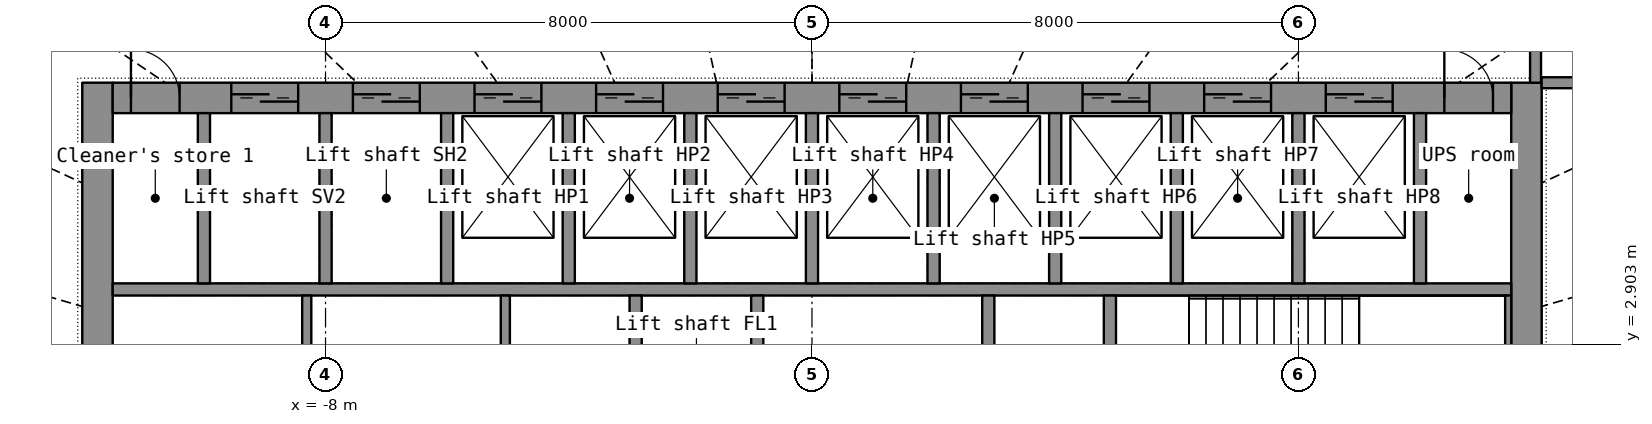
"""IFC4 building model, lengths in metres.
Left out: names, types, materials, properties, quantities, classifications, styles, units other than length and angle.
Written with IfcOpenShell. Run it as: python <this file> out.ifc"""

import sys

from ifc_helpers import new_model, si_unit, direction, frame, frame_2d, origin, place, context, subcontext, project, spatial, rectangle, extrude, element, fill, save


model = new_model("IFC4")
c1 = context("Model", 3, precision=1e-05, world=origin(), true_north=direction((0.0, 1.0)))
c2 = subcontext(c1, "Body", "Model", "MODEL_VIEW")
j1 = project(units=[si_unit("LENGTHUNIT", "METRE"), si_unit("PLANEANGLEUNIT", "RADIAN")], contexts=[c1])
p1 = place(None, origin())
s1 = spatial("IfcSite", under=j1, at=p1, CompositionType="ELEMENT")
p2 = place(p1, origin())
s2 = spatial("IfcBuilding", under=s1, at=p2, CompositionType="ELEMENT")
p3 = place(p2, frame((0.0, 0.0, 145.2)))
s3 = spatial("IfcBuildingStorey", under=s2, at=p3, CompositionType="ELEMENT", Elevation=145.2)
p4 = place(p3, frame((-11.75, -7.2, 0.0), z_axis=(0.0, 0.0, 1.0), x_axis=(0.0, 1.0, 0.0)))
e1 = element("IfcWall", 1, at=p4, inside=s3, PredefinedType="SHEAR", context=c2, shape_type="SweptSolid", body=[
    extrude(rectangle(XDim=14.4, YDim=0.5, at=frame_2d((7.2, 0.0))), origin(), (0.0, 0.0, 1.0), 7.0),
])
p5 = place(p4, frame((6.5, 0.0, 0.0)))
e2 = element("IfcOpeningElement", 2, at=p5, cuts=e1, PredefinedType="OPENING", context=c2, shape_type="SweptSolid", body=[
    extrude(rectangle(XDim=1.4, YDim=2.2, at=frame_2d((0.7, 1.1))), frame((0.0, 0.26, 0.0), z_axis=(0.0, -1.0, 0.0), x_axis=(1.0, 0.0, 0.0)), (0.0, 0.0, 1.0), 0.52),
])
p6 = place(p3, frame((11.75, -7.2, 0.0), z_axis=(0.0, 0.0, 1.0), x_axis=(0.0, 1.0, 0.0)))
e3 = element("IfcWall", 3, at=p6, inside=s3, PredefinedType="SHEAR", context=c2, shape_type="SweptSolid", body=[
    extrude(rectangle(XDim=14.4, YDim=0.5, at=frame_2d((7.2, 0.0))), origin(), (0.0, 0.0, 1.0), 7.0),
])
p7 = place(p6, frame((6.5, 0.0, 0.0)))
e4 = element("IfcOpeningElement", 4, at=p7, cuts=e3, PredefinedType="OPENING", context=c2, shape_type="SweptSolid", body=[
    extrude(rectangle(XDim=1.4, YDim=2.2, at=frame_2d((0.7, 1.1))), frame((0.0, 0.26, 0.0), z_axis=(0.0, -1.0, 0.0), x_axis=(1.0, 0.0, 0.0)), (0.0, 0.0, 1.0), 0.52),
])
p8 = place(p3, frame((-11.5, 6.95, 0.0), z_axis=(0.0, 0.0, 1.0), x_axis=(1.0, 0.0, 0.0)))
e5 = element("IfcWall", 5, at=p8, inside=s3, PredefinedType="SHEAR", context=c2, shape_type="SweptSolid", body=[
    extrude(rectangle(XDim=23.0, YDim=0.5, at=frame_2d((11.5, 0.0))), origin(), (0.0, 0.0, 1.0), 7.0),
])
p9 = place(p8, frame((1.95, 0.0, 0.0)))
e6 = element("IfcOpeningElement", 6, at=p9, cuts=e5, PredefinedType="OPENING", context=c2, shape_type="SweptSolid", body=[
    extrude(rectangle(XDim=1.1, YDim=2.2, at=frame_2d((0.55, 1.1))), frame((0.0, 0.26, 0.0), z_axis=(0.0, -1.0, 0.0), x_axis=(1.0, 0.0, 0.0)), (0.0, 0.0, 1.0), 0.52),
])
p10 = place(p8, frame((3.95, 0.0, 0.0)))
e7 = element("IfcOpeningElement", 7, at=p10, cuts=e5, PredefinedType="OPENING", context=c2, shape_type="SweptSolid", body=[
    extrude(rectangle(XDim=1.1, YDim=2.2, at=frame_2d((0.55, 1.1))), frame((0.0, 0.26, 0.0), z_axis=(0.0, -1.0, 0.0), x_axis=(1.0, 0.0, 0.0)), (0.0, 0.0, 1.0), 0.52),
])
p11 = place(p8, frame((5.95, 0.0, 0.0)))
e8 = element("IfcOpeningElement", 8, at=p11, cuts=e5, PredefinedType="OPENING", context=c2, shape_type="SweptSolid", body=[
    extrude(rectangle(XDim=1.1, YDim=2.2, at=frame_2d((0.55, 1.1))), frame((0.0, 0.26, 0.0), z_axis=(0.0, -1.0, 0.0), x_axis=(1.0, 0.0, 0.0)), (0.0, 0.0, 1.0), 0.52),
])
p12 = place(p8, frame((7.95, 0.0, 0.0)))
e9 = element("IfcOpeningElement", 9, at=p12, cuts=e5, PredefinedType="OPENING", context=c2, shape_type="SweptSolid", body=[
    extrude(rectangle(XDim=1.1, YDim=2.2, at=frame_2d((0.55, 1.1))), frame((0.0, 0.26, 0.0), z_axis=(0.0, -1.0, 0.0), x_axis=(1.0, 0.0, 0.0)), (0.0, 0.0, 1.0), 0.52),
])
p13 = place(p8, frame((9.95, 0.0, 0.0)))
e10 = element("IfcOpeningElement", 10, at=p13, cuts=e5, PredefinedType="OPENING", context=c2, shape_type="SweptSolid", body=[
    extrude(rectangle(XDim=1.1, YDim=2.2, at=frame_2d((0.55, 1.1))), frame((0.0, 0.26, 0.0), z_axis=(0.0, -1.0, 0.0), x_axis=(1.0, 0.0, 0.0)), (0.0, 0.0, 1.0), 0.52),
])
p14 = place(p8, frame((11.95, 0.0, 0.0)))
e11 = element("IfcOpeningElement", 11, at=p14, cuts=e5, PredefinedType="OPENING", context=c2, shape_type="SweptSolid", body=[
    extrude(rectangle(XDim=1.1, YDim=2.2, at=frame_2d((0.55, 1.1))), frame((0.0, 0.26, 0.0), z_axis=(0.0, -1.0, 0.0), x_axis=(1.0, 0.0, 0.0)), (0.0, 0.0, 1.0), 0.52),
])
p15 = place(p8, frame((13.95, 0.0, 0.0)))
e12 = element("IfcOpeningElement", 12, at=p15, cuts=e5, PredefinedType="OPENING", context=c2, shape_type="SweptSolid", body=[
    extrude(rectangle(XDim=1.1, YDim=2.2, at=frame_2d((0.55, 1.1))), frame((0.0, 0.26, 0.0), z_axis=(0.0, -1.0, 0.0), x_axis=(1.0, 0.0, 0.0)), (0.0, 0.0, 1.0), 0.52),
])
p16 = place(p8, frame((15.95, 0.0, 0.0)))
e13 = element("IfcOpeningElement", 13, at=p16, cuts=e5, PredefinedType="OPENING", context=c2, shape_type="SweptSolid", body=[
    extrude(rectangle(XDim=1.1, YDim=2.2, at=frame_2d((0.55, 1.1))), frame((0.0, 0.26, 0.0), z_axis=(0.0, -1.0, 0.0), x_axis=(1.0, 0.0, 0.0)), (0.0, 0.0, 1.0), 0.52),
])
p17 = place(p8, frame((17.95, 0.0, 0.0)))
e14 = element("IfcOpeningElement", 14, at=p17, cuts=e5, PredefinedType="OPENING", context=c2, shape_type="SweptSolid", body=[
    extrude(rectangle(XDim=1.1, YDim=2.2, at=frame_2d((0.55, 1.1))), frame((0.0, 0.26, 0.0), z_axis=(0.0, -1.0, 0.0), x_axis=(1.0, 0.0, 0.0)), (0.0, 0.0, 1.0), 0.52),
])
p18 = place(p8, frame((19.95, 0.0, 0.0)))
e15 = element("IfcOpeningElement", 15, at=p18, cuts=e5, PredefinedType="OPENING", context=c2, shape_type="SweptSolid", body=[
    extrude(rectangle(XDim=1.1, YDim=2.2, at=frame_2d((0.55, 1.1))), frame((0.0, 0.26, 0.0), z_axis=(0.0, -1.0, 0.0), x_axis=(1.0, 0.0, 0.0)), (0.0, 0.0, 1.0), 0.52),
])
p19 = place(p8, frame((0.3, 0.0, 0.0)))
e16 = element("IfcOpeningElement", 16, at=p19, cuts=e5, PredefinedType="OPENING", context=c2, shape_type="SweptSolid", body=[
    extrude(rectangle(XDim=0.8, YDim=2.05, at=frame_2d((0.4, 1.025))), frame((0.0, 0.26, 0.0), z_axis=(0.0, -1.0, 0.0), x_axis=(1.0, 0.0, 0.0)), (0.0, 0.0, 1.0), 0.52),
])
p20 = place(p8, frame((21.9, 0.0, 0.0)))
e17 = element("IfcOpeningElement", 17, at=p20, cuts=e5, PredefinedType="OPENING", context=c2, shape_type="SweptSolid", body=[
    extrude(rectangle(XDim=0.8, YDim=2.05, at=frame_2d((0.4, 1.025))), frame((0.0, 0.26, 0.0), z_axis=(0.0, -1.0, 0.0), x_axis=(1.0, 0.0, 0.0)), (0.0, 0.0, 1.0), 0.52),
])
p21 = place(p3, frame((-11.5, 3.8, 0.0), z_axis=(0.0, 0.0, 1.0), x_axis=(1.0, 0.0, 0.0)))
e18 = element("IfcWall", 18, at=p21, inside=s3, PredefinedType="SHEAR", context=c2, shape_type="SweptSolid", body=[
    extrude(rectangle(XDim=23.0, YDim=0.2, at=frame_2d((11.5, 0.0))), origin(), (0.0, 0.0, 1.0), 7.0),
])
for number, where, z_axis, x_axis in (
    (19, (-10.0, 3.9, 0.0), (0.0, 0.0, 1.0), (0.0, 1.0, 0.0)),
    (20, (-8.0, 3.9, 0.0), (0.0, 0.0, 1.0), (0.0, 1.0, 0.0)),
    (21, (-6.0, 3.9, 0.0), (0.0, 0.0, 1.0), (0.0, 1.0, 0.0)),
    (22, (-4.0, 3.9, 0.0), (0.0, 0.0, 1.0), (0.0, 1.0, 0.0)),
    (23, (-2.0, 3.9, 0.0), (0.0, 0.0, 1.0), (0.0, 1.0, 0.0)),
    (24, (0.0, 3.9, 0.0), (0.0, 0.0, 1.0), (0.0, 1.0, 0.0)),
    (25, (2.0, 3.9, 0.0), (0.0, 0.0, 1.0), (0.0, 1.0, 0.0)),
    (26, (4.0, 3.9, 0.0), (0.0, 0.0, 1.0), (0.0, 1.0, 0.0)),
    (27, (6.0, 3.9, 0.0), (0.0, 0.0, 1.0), (0.0, 1.0, 0.0)),
    (28, (8.0, 3.9, 0.0), (0.0, 0.0, 1.0), (0.0, 1.0, 0.0)),
    (29, (10.0, 3.9, 0.0), (0.0, 0.0, 1.0), (0.0, 1.0, 0.0)),
):
    element("IfcWall", number, at=place(p3, frame(where, z_axis=z_axis, x_axis=x_axis)), inside=s3, PredefinedType="SHEAR", context=c2, shape_type="SweptSolid", body=[
        extrude(rectangle(XDim=2.8, YDim=0.2, at=frame_2d((1.4, 0.0))), origin(), (0.0, 0.0, 1.0), 7.0),
    ])
p22 = place(p3, frame((-2.9, -3.7, 0.0), z_axis=(0.0, 0.0, 1.0), x_axis=(0.0, 1.0, 0.0)))
e30 = element("IfcWall", 30, at=p22, inside=s3, PredefinedType="SHEAR", context=c2, shape_type="SweptSolid", body=[
    extrude(rectangle(XDim=7.4, YDim=0.2, at=frame_2d((3.7, 0.0))), origin(), (0.0, 0.0, 1.0), 7.0),
])
p23 = place(p22, frame((3.1, 0.0, 0.0)))
e31 = element("IfcOpeningElement", 31, at=p23, cuts=e30, PredefinedType="OPENING", context=c2, shape_type="SweptSolid", body=[
    extrude(rectangle(XDim=1.2, YDim=2.2, at=frame_2d((0.6, 1.1))), frame((0.0, 0.11, 0.0), z_axis=(0.0, -1.0, 0.0), x_axis=(1.0, 0.0, 0.0)), (0.0, 0.0, 1.0), 0.22),
])
p24 = place(p3, frame((2.9, -3.7, 0.0), z_axis=(0.0, 0.0, 1.0), x_axis=(0.0, 1.0, 0.0)))
e32 = element("IfcWall", 32, at=p24, inside=s3, PredefinedType="SHEAR", context=c2, shape_type="SweptSolid", body=[
    extrude(rectangle(XDim=7.4, YDim=0.2, at=frame_2d((3.7, 0.0))), origin(), (0.0, 0.0, 1.0), 7.0),
])
p25 = place(p24, frame((3.1, 0.0, 0.0)))
e33 = element("IfcOpeningElement", 33, at=p25, cuts=e32, PredefinedType="OPENING", context=c2, shape_type="SweptSolid", body=[
    extrude(rectangle(XDim=1.2, YDim=2.2, at=frame_2d((0.6, 1.1))), frame((0.0, 0.11, 0.0), z_axis=(0.0, -1.0, 0.0), x_axis=(1.0, 0.0, 0.0)), (0.0, 0.0, 1.0), 0.22),
])
p26 = place(p3, frame((-0.9, 1.35, 0.0), z_axis=(0.0, 0.0, 1.0), x_axis=(0.0, 1.0, 0.0)))
e34 = element("IfcWall", 34, at=p26, inside=s3, PredefinedType="SHEAR", context=c2, shape_type="SweptSolid", body=[
    extrude(rectangle(XDim=2.35, YDim=0.2, at=frame_2d((1.175, 0.0))), origin(), (0.0, 0.0, 1.0), 7.0),
])
p27 = place(p3, frame((11.45, 1.35, 0.0), z_axis=(0.0, 0.0, 1.0), x_axis=(0.0, 1.0, 0.0)))
e35 = element("IfcWall", 35, at=p27, inside=s3, PredefinedType="SHEAR", context=c2, shape_type="SweptSolid", body=[
    extrude(rectangle(XDim=2.35, YDim=0.1, at=frame_2d((1.175, 0.0))), origin(), (0.0, 0.0, 1.0), 7.0),
])
p28 = place(p3, frame((4.9, 1.35, 0.0), z_axis=(0.0, 0.0, 1.0), x_axis=(0.0, 1.0, 0.0)))
e36 = element("IfcWall", 36, at=p28, inside=s3, PredefinedType="SHEAR", context=c2, shape_type="SweptSolid", body=[
    extrude(rectangle(XDim=2.35, YDim=0.2, at=frame_2d((1.175, 0.0))), origin(), (0.0, 0.0, 1.0), 7.0),
])
for number, where, z_axis, x_axis in (
    (37, (-8.309, 1.35, 0.0), (0.0, 0.0, 1.0), (0.0, 1.0, 0.0)),
    (38, (-5.043, 1.35, 0.0), (0.0, 0.0, 1.0), (0.0, 1.0, 0.0)),
):
    element("IfcWall", number, at=place(p3, frame(where, z_axis=z_axis, x_axis=x_axis)), inside=s3, PredefinedType="PARTITIONING", context=c2, shape_type="SweptSolid", body=[
        extrude(rectangle(XDim=2.35, YDim=0.15, at=frame_2d((1.175, 0.0))), origin(), (0.0, 0.0, 1.0), 7.0),
    ])
p29 = place(p3, frame((11.9, 12.1, 0.0), z_axis=(0.0, 0.0, 1.0), x_axis=(0.0, -1.0, 0.0)))
e39 = element("IfcWall", 39, at=p29, inside=s3, PredefinedType="PARTITIONING", context=c2, shape_type="SweptSolid", body=[
    extrude(rectangle(XDim=4.9, YDim=0.18, at=frame_2d((2.45, 0.0))), origin(), (0.0, 0.0, 1.0), 6.1),
])
p30 = place(p29, frame((1.95, 0.0, 0.0)))
e40 = element("IfcOpeningElement", 40, at=p30, cuts=e39, PredefinedType="OPENING", context=c2, shape_type="SweptSolid", body=[
    extrude(rectangle(XDim=1.0, YDim=2.1, at=frame_2d((0.5, 1.05))), frame((0.0, 0.1, 0.0), z_axis=(0.0, -1.0, 0.0), x_axis=(1.0, 0.0, 0.0)), (0.0, 0.0, 1.0), 0.2),
])
p31 = place(p3, frame((12.0, 7.2, 0.0), z_axis=(0.0, 0.0, 1.0), x_axis=(1.0, 0.0, 0.0)))
e41 = element("IfcWall", 41, at=p31, inside=s3, PredefinedType="PARTITIONING", context=c2, shape_type="SweptSolid", body=[
    extrude(rectangle(XDim=4.9, YDim=0.18, at=frame_2d((2.45, 0.0))), origin(), (0.0, 0.0, 1.0), 6.1),
])
p32 = place(p9, origin())
e42 = element("IfcDoor", 42, at=p32, inside=s3, OperationType="DOUBLE_DOOR_SLIDING", PredefinedType="DOOR", context=c2, shape_type="SweptSolid", body=[
    extrude(rectangle(XDim=1.1, YDim=2.2, at=frame_2d((0.55, 1.1))), frame((0.0, 0.025, 0.0), z_axis=(0.0, -1.0, 0.0), x_axis=(1.0, 0.0, 0.0)), (0.0, 0.0, 1.0), 0.05),
])
fill(e6, e42)
p33 = place(p10, origin())
e43 = element("IfcDoor", 43, at=p33, inside=s3, OperationType="DOUBLE_DOOR_SLIDING", PredefinedType="DOOR", context=c2, shape_type="SweptSolid", body=[
    extrude(rectangle(XDim=1.1, YDim=2.2, at=frame_2d((0.55, 1.1))), frame((0.0, 0.025, 0.0), z_axis=(0.0, -1.0, 0.0), x_axis=(1.0, 0.0, 0.0)), (0.0, 0.0, 1.0), 0.05),
])
fill(e7, e43)
p34 = place(p11, origin())
e44 = element("IfcDoor", 44, at=p34, inside=s3, OperationType="DOUBLE_DOOR_SLIDING", PredefinedType="DOOR", context=c2, shape_type="SweptSolid", body=[
    extrude(rectangle(XDim=1.1, YDim=2.2, at=frame_2d((0.55, 1.1))), frame((0.0, 0.025, 0.0), z_axis=(0.0, -1.0, 0.0), x_axis=(1.0, 0.0, 0.0)), (0.0, 0.0, 1.0), 0.05),
])
fill(e8, e44)
p35 = place(p12, origin())
e45 = element("IfcDoor", 45, at=p35, inside=s3, OperationType="DOUBLE_DOOR_SLIDING", PredefinedType="DOOR", context=c2, shape_type="SweptSolid", body=[
    extrude(rectangle(XDim=1.1, YDim=2.2, at=frame_2d((0.55, 1.1))), frame((0.0, 0.025, 0.0), z_axis=(0.0, -1.0, 0.0), x_axis=(1.0, 0.0, 0.0)), (0.0, 0.0, 1.0), 0.05),
])
fill(e9, e45)
p36 = place(p13, origin())
e46 = element("IfcDoor", 46, at=p36, inside=s3, OperationType="DOUBLE_DOOR_SLIDING", PredefinedType="DOOR", context=c2, shape_type="SweptSolid", body=[
    extrude(rectangle(XDim=1.1, YDim=2.2, at=frame_2d((0.55, 1.1))), frame((0.0, 0.025, 0.0), z_axis=(0.0, -1.0, 0.0), x_axis=(1.0, 0.0, 0.0)), (0.0, 0.0, 1.0), 0.05),
])
fill(e10, e46)
p37 = place(p14, origin())
e47 = element("IfcDoor", 47, at=p37, inside=s3, OperationType="DOUBLE_DOOR_SLIDING", PredefinedType="DOOR", context=c2, shape_type="SweptSolid", body=[
    extrude(rectangle(XDim=1.1, YDim=2.2, at=frame_2d((0.55, 1.1))), frame((0.0, 0.025, 0.0), z_axis=(0.0, -1.0, 0.0), x_axis=(1.0, 0.0, 0.0)), (0.0, 0.0, 1.0), 0.05),
])
fill(e11, e47)
p38 = place(p15, origin())
e48 = element("IfcDoor", 48, at=p38, inside=s3, OperationType="DOUBLE_DOOR_SLIDING", PredefinedType="DOOR", context=c2, shape_type="SweptSolid", body=[
    extrude(rectangle(XDim=1.1, YDim=2.2, at=frame_2d((0.55, 1.1))), frame((0.0, 0.025, 0.0), z_axis=(0.0, -1.0, 0.0), x_axis=(1.0, 0.0, 0.0)), (0.0, 0.0, 1.0), 0.05),
])
fill(e12, e48)
p39 = place(p16, origin())
e49 = element("IfcDoor", 49, at=p39, inside=s3, OperationType="DOUBLE_DOOR_SLIDING", PredefinedType="DOOR", context=c2, shape_type="SweptSolid", body=[
    extrude(rectangle(XDim=1.1, YDim=2.2, at=frame_2d((0.55, 1.1))), frame((0.0, 0.025, 0.0), z_axis=(0.0, -1.0, 0.0), x_axis=(1.0, 0.0, 0.0)), (0.0, 0.0, 1.0), 0.05),
])
fill(e13, e49)
p40 = place(p17, origin())
e50 = element("IfcDoor", 50, at=p40, inside=s3, OperationType="DOUBLE_DOOR_SLIDING", PredefinedType="DOOR", context=c2, shape_type="SweptSolid", body=[
    extrude(rectangle(XDim=1.1, YDim=2.2, at=frame_2d((0.55, 1.1))), frame((0.0, 0.025, 0.0), z_axis=(0.0, -1.0, 0.0), x_axis=(1.0, 0.0, 0.0)), (0.0, 0.0, 1.0), 0.05),
])
fill(e14, e50)
p41 = place(p18, origin())
e51 = element("IfcDoor", 51, at=p41, inside=s3, OperationType="DOUBLE_DOOR_SLIDING", PredefinedType="DOOR", context=c2, shape_type="SweptSolid", body=[
    extrude(rectangle(XDim=1.1, YDim=2.2, at=frame_2d((0.55, 1.1))), frame((0.0, 0.025, 0.0), z_axis=(0.0, -1.0, 0.0), x_axis=(1.0, 0.0, 0.0)), (0.0, 0.0, 1.0), 0.05),
])
fill(e15, e51)
p42 = place(p19, origin())
e52 = element("IfcDoor", 52, at=p42, inside=s3, OperationType="SINGLE_SWING_LEFT", PredefinedType="DOOR", context=c2, shape_type="SweptSolid", body=[
    extrude(rectangle(XDim=0.8, YDim=2.05, at=frame_2d((0.4, 1.025))), frame((0.0, 0.025, 0.0), z_axis=(0.0, -1.0, 0.0), x_axis=(1.0, 0.0, 0.0)), (0.0, 0.0, 1.0), 0.05),
])
fill(e16, e52)
p43 = place(p20, origin())
e53 = element("IfcDoor", 53, at=p43, inside=s3, OperationType="SINGLE_SWING_LEFT", PredefinedType="DOOR", context=c2, shape_type="SweptSolid", body=[
    extrude(rectangle(XDim=0.8, YDim=2.05, at=frame_2d((0.4, 1.025))), frame((0.0, 0.025, 0.0), z_axis=(0.0, -1.0, 0.0), x_axis=(1.0, 0.0, 0.0)), (0.0, 0.0, 1.0), 0.05),
])
fill(e17, e53)
save(model, sys.argv[1])
